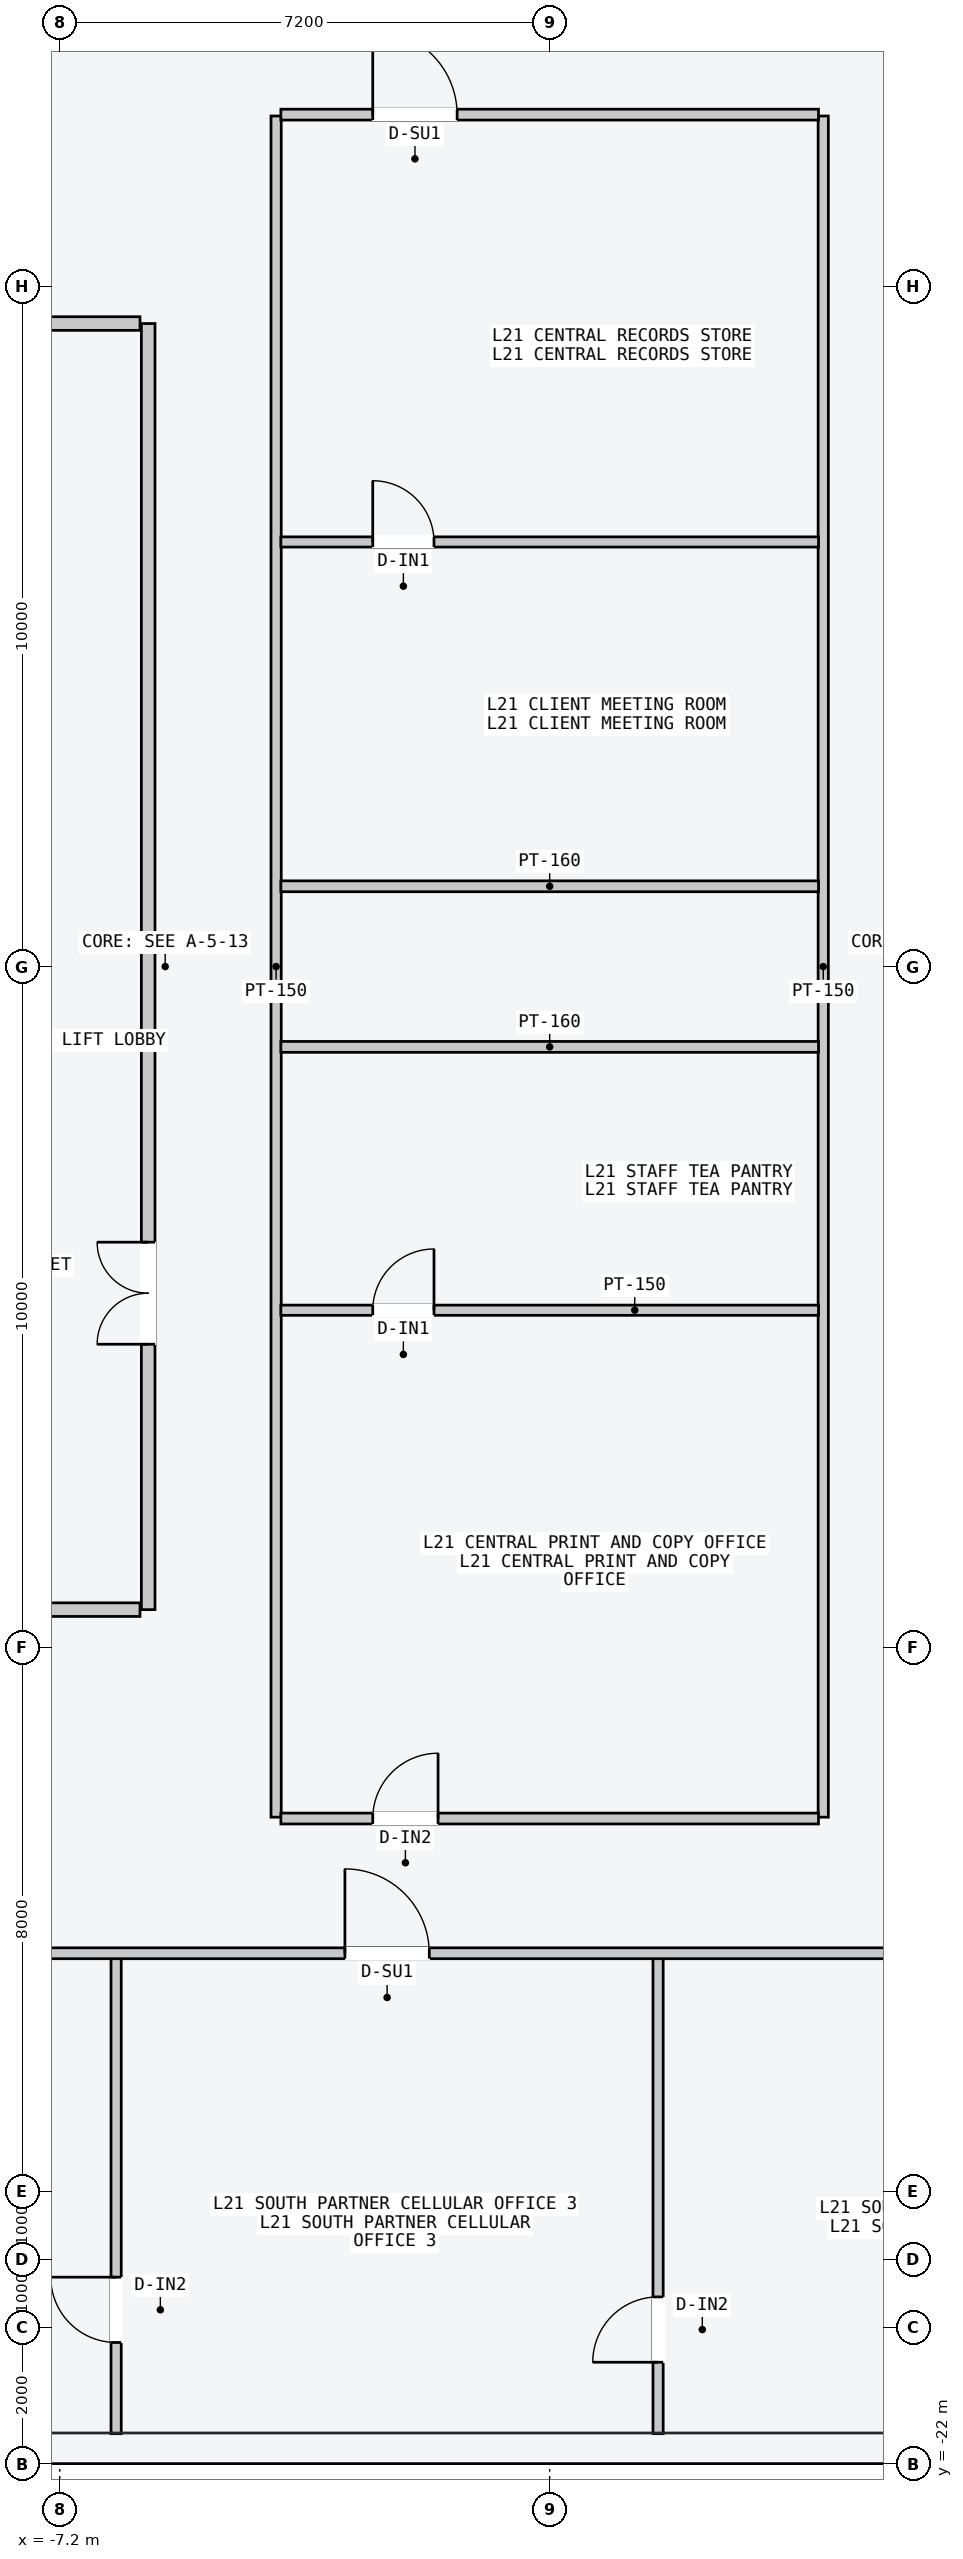
"""IFC4 building model, lengths in metres.
Left out: names, types, materials, properties, quantities, classifications, styles, units other than length and angle.
Written with IfcOpenShell. Run it as: python <this file> out.ifc"""

import sys

from ifc_helpers import new_model, si_unit, direction, frame, frame_2d, origin, place, context, subcontext, project, spatial, rectangle, extrude, element, fill, save


model = new_model("IFC4")
c1 = context("Model", 3, precision=1e-05, world=origin(), true_north=direction((0.0, 1.0)))
c2 = subcontext(c1, "Body", "Model", "MODEL_VIEW")
j1 = project(units=[si_unit("LENGTHUNIT", "METRE"), si_unit("PLANEANGLEUNIT", "RADIAN")], contexts=[c1])
p1 = place(None, origin())
s1 = spatial("IfcSite", under=j1, at=p1, CompositionType="ELEMENT")
p2 = place(p1, origin())
s2 = spatial("IfcBuilding", under=s1, at=p2, CompositionType="ELEMENT")
p3 = place(p2, frame((0.0, 0.0, 82.8)))
s3 = spatial("IfcBuildingStorey", under=s2, at=p3, CompositionType="ELEMENT", Elevation=82.8)
p4 = place(p3, frame((-5.9, -9.45, 0.0), z_axis=(0.0, 0.0, 1.0), x_axis=(0.0, 1.0, 0.0)))
e1 = element("IfcWall", 1, at=p4, inside=s3, PredefinedType="PARTITIONING", context=c2, shape_type="SweptSolid", body=[
    extrude(rectangle(XDim=18.9, YDim=0.2, at=frame_2d((9.45, 0.0))), origin(), (0.0, 0.0, 1.0), 4.3),
])
p5 = place(p4, frame((3.9, 0.0, 0.0)))
e2 = element("IfcOpeningElement", 2, at=p5, cuts=e1, PredefinedType="OPENING", context=c2, shape_type="SweptSolid", body=[
    extrude(rectangle(XDim=1.5, YDim=2.2, at=frame_2d((0.75, 1.1))), frame((0.0, 0.11, 0.0), z_axis=(0.0, -1.0, 0.0), x_axis=(1.0, 0.0, 0.0)), (0.0, 0.0, 1.0), 0.22),
])
for number, where, z_axis, x_axis in (
    (3, (-6.02, -9.45, 0.0), (0.0, 0.0, 1.0), (-1.0, 0.0, 0.0)),
    (4, (-6.02, 9.45, 0.0), (0.0, 0.0, 1.0), (-1.0, 0.0, 0.0)),
):
    element("IfcWall", number, at=place(p3, frame(where, z_axis=z_axis, x_axis=x_axis)), inside=s3, PredefinedType="PARTITIONING", context=c2, shape_type="SweptSolid", body=[
        extrude(rectangle(XDim=1.8, YDim=0.2, at=frame_2d((0.9, 0.0))), origin(), (0.0, 0.0, 1.0), 2.64),
    ])
for number, where, z_axis, x_axis in (
    (5, (-4.02, -12.5, 0.0), (0.0, 0.0, 1.0), (0.0, 1.0, 0.0)),
    (6, (4.02, -12.5, 0.0), (0.0, 0.0, 1.0), (0.0, 1.0, 0.0)),
):
    element("IfcWall", number, at=place(p3, frame(where, z_axis=z_axis, x_axis=x_axis)), inside=s3, PredefinedType="PARTITIONING", context=c2, shape_type="SweptSolid", body=[
        extrude(rectangle(XDim=25.0, YDim=0.15, at=frame_2d((12.5, 0.0))), origin(), (0.0, 0.0, 1.0), 4.3),
    ])
p6 = place(p3, frame((-3.95, 1.18, 0.0), z_axis=(0.0, 0.0, 1.0), x_axis=(1.0, 0.0, 0.0)))
e7 = element("IfcWall", 7, at=p6, inside=s3, PredefinedType="PARTITIONING", context=c2, shape_type="SweptSolid", body=[
    extrude(rectangle(XDim=7.9, YDim=0.16, at=frame_2d((3.95, 0.0))), origin(), (0.0, 0.0, 1.0), 4.3),
])
p7 = place(p3, frame((-3.95, 12.52, 0.0), z_axis=(0.0, 0.0, 1.0), x_axis=(1.0, 0.0, 0.0)))
e8 = element("IfcWall", 8, at=p7, inside=s3, PredefinedType="PARTITIONING", context=c2, shape_type="SweptSolid", body=[
    extrude(rectangle(XDim=7.9, YDim=0.16, at=frame_2d((3.95, 0.0))), origin(), (0.0, 0.0, 1.0), 4.3),
])
p8 = place(p7, frame((1.35, 0.0, 0.0)))
e9 = element("IfcOpeningElement", 9, at=p8, cuts=e8, PredefinedType="OPENING", context=c2, shape_type="SweptSolid", body=[
    extrude(rectangle(XDim=1.24, YDim=2.24, at=frame_2d((0.62, 1.12))), frame((0.0, 0.09, 0.0), z_axis=(0.0, -1.0, 0.0), x_axis=(1.0, 0.0, 0.0)), (0.0, 0.0, 1.0), 0.18),
])
p9 = place(p3, frame((-3.95, -1.18, 0.0), z_axis=(0.0, 0.0, 1.0), x_axis=(1.0, 0.0, 0.0)))
e10 = element("IfcWall", 10, at=p9, inside=s3, PredefinedType="PARTITIONING", context=c2, shape_type="SweptSolid", body=[
    extrude(rectangle(XDim=7.9, YDim=0.16, at=frame_2d((3.95, 0.0))), origin(), (0.0, 0.0, 1.0), 4.3),
])
p10 = place(p3, frame((-3.95, -12.52, 0.0), z_axis=(0.0, 0.0, 1.0), x_axis=(1.0, 0.0, 0.0)))
e11 = element("IfcWall", 11, at=p10, inside=s3, PredefinedType="PARTITIONING", context=c2, shape_type="SweptSolid", body=[
    extrude(rectangle(XDim=7.9, YDim=0.16, at=frame_2d((3.95, 0.0))), origin(), (0.0, 0.0, 1.0), 4.3),
])
p11 = place(p10, frame((1.35, 0.0, 0.0)))
e12 = element("IfcOpeningElement", 12, at=p11, cuts=e11, PredefinedType="OPENING", context=c2, shape_type="SweptSolid", body=[
    extrude(rectangle(XDim=0.96, YDim=2.18, at=frame_2d((0.48, 1.09))), frame((0.0, 0.09, 0.0), z_axis=(0.0, -1.0, 0.0), x_axis=(1.0, 0.0, 0.0)), (0.0, 0.0, 1.0), 0.18),
])
p12 = place(p3, frame((-3.95, 6.24, 0.0), z_axis=(0.0, 0.0, 1.0), x_axis=(1.0, 0.0, 0.0)))
e13 = element("IfcWall", 13, at=p12, inside=s3, PredefinedType="PARTITIONING", context=c2, shape_type="SweptSolid", body=[
    extrude(rectangle(XDim=7.9, YDim=0.15, at=frame_2d((3.95, 0.0))), origin(), (0.0, 0.0, 1.0), 4.3),
])
p13 = place(p12, frame((1.35, 0.0, 0.0)))
e14 = element("IfcOpeningElement", 14, at=p13, cuts=e13, PredefinedType="OPENING", context=c2, shape_type="SweptSolid", body=[
    extrude(rectangle(XDim=0.9, YDim=2.15, at=frame_2d((0.45, 1.075))), frame((0.0, 0.085, 0.0), z_axis=(0.0, -1.0, 0.0), x_axis=(1.0, 0.0, 0.0)), (0.0, 0.0, 1.0), 0.17),
])
p14 = place(p3, frame((-3.95, -5.05, 0.0), z_axis=(0.0, 0.0, 1.0), x_axis=(1.0, 0.0, 0.0)))
e15 = element("IfcWall", 15, at=p14, inside=s3, PredefinedType="PARTITIONING", context=c2, shape_type="SweptSolid", body=[
    extrude(rectangle(XDim=7.9, YDim=0.15, at=frame_2d((3.95, 0.0))), origin(), (0.0, 0.0, 1.0), 4.3),
])
p15 = place(p14, frame((1.35, 0.0, 0.0)))
e16 = element("IfcOpeningElement", 16, at=p15, cuts=e15, PredefinedType="OPENING", context=c2, shape_type="SweptSolid", body=[
    extrude(rectangle(XDim=0.9, YDim=2.15, at=frame_2d((0.45, 1.075))), frame((0.0, 0.085, 0.0), z_axis=(0.0, -1.0, 0.0), x_axis=(1.0, 0.0, 0.0)), (0.0, 0.0, 1.0), 0.17),
])
p16 = place(p3, frame((-6.371, -21.56, 0.0), z_axis=(0.0, 0.0, 1.0), x_axis=(0.0, 1.0, 0.0)))
e17 = element("IfcWall", 17, at=p16, inside=s3, PredefinedType="PARTITIONING", context=c2, shape_type="SweptSolid", body=[
    extrude(rectangle(XDim=7.0, YDim=0.15, at=frame_2d((3.5, 0.0))), origin(), (0.0, 0.0, 1.0), 4.3),
])
p17 = place(p16, frame((1.34, 0.0, 0.0)))
e18 = element("IfcOpeningElement", 18, at=p17, cuts=e17, PredefinedType="OPENING", context=c2, shape_type="SweptSolid", body=[
    extrude(rectangle(XDim=0.96, YDim=2.18, at=frame_2d((0.48, 1.09))), frame((0.0, 0.085, 0.0), z_axis=(0.0, -1.0, 0.0), x_axis=(1.0, 0.0, 0.0)), (0.0, 0.0, 1.0), 0.17),
])
p18 = place(p3, frame((1.593, -21.56, 0.0), z_axis=(0.0, 0.0, 1.0), x_axis=(0.0, 1.0, 0.0)))
e19 = element("IfcWall", 19, at=p18, inside=s3, PredefinedType="PARTITIONING", context=c2, shape_type="SweptSolid", body=[
    extrude(rectangle(XDim=7.0, YDim=0.15, at=frame_2d((3.5, 0.0))), origin(), (0.0, 0.0, 1.0), 4.3),
])
p19 = place(p18, frame((1.05, 0.0, 0.0)))
e20 = element("IfcOpeningElement", 20, at=p19, cuts=e19, PredefinedType="OPENING", context=c2, shape_type="SweptSolid", body=[
    extrude(rectangle(XDim=0.96, YDim=2.18, at=frame_2d((0.48, 1.09))), frame((0.0, 0.085, 0.0), z_axis=(0.0, -1.0, 0.0), x_axis=(1.0, 0.0, 0.0)), (0.0, 0.0, 1.0), 0.17),
])
p20 = place(p3, frame((-18.0, -14.5, 0.0), z_axis=(0.0, 0.0, 1.0), x_axis=(1.0, 0.0, 0.0)))
e21 = element("IfcWall", 21, at=p20, inside=s3, PredefinedType="PARTITIONING", context=c2, shape_type="SweptSolid", body=[
    extrude(rectangle(XDim=36.0, YDim=0.16, at=frame_2d((18.0, 0.0))), origin(), (0.0, 0.0, 1.0), 4.3),
])
p21 = place(p20, frame((1.721, 0.0, 0.0)))
e22 = element("IfcOpeningElement", 22, at=p21, cuts=e21, PredefinedType="OPENING", context=c2, shape_type="SweptSolid", body=[
    extrude(rectangle(XDim=1.02, YDim=2.2, at=frame_2d((0.51, 1.1))), frame((0.0, 0.09, 0.0), z_axis=(0.0, -1.0, 0.0), x_axis=(1.0, 0.0, 0.0)), (0.0, 0.0, 1.0), 0.18),
])
p22 = place(p20, frame((7.515, 0.0, 0.0)))
e23 = element("IfcOpeningElement", 23, at=p22, cuts=e21, PredefinedType="OPENING", context=c2, shape_type="SweptSolid", body=[
    extrude(rectangle(XDim=1.06, YDim=2.2, at=frame_2d((0.53, 1.1))), frame((0.0, 0.09, 0.0), z_axis=(0.0, -1.0, 0.0), x_axis=(1.0, 0.0, 0.0)), (0.0, 0.0, 1.0), 0.18),
])
p23 = place(p20, frame((14.991, 0.0, 0.0)))
e24 = element("IfcOpeningElement", 24, at=p23, cuts=e21, PredefinedType="OPENING", context=c2, shape_type="SweptSolid", body=[
    extrude(rectangle(XDim=1.24, YDim=2.24, at=frame_2d((0.62, 1.12))), frame((0.0, 0.09, 0.0), z_axis=(0.0, -1.0, 0.0), x_axis=(1.0, 0.0, 0.0)), (0.0, 0.0, 1.0), 0.18),
])
p24 = place(p20, frame((23.273, 0.0, 0.0)))
e25 = element("IfcOpeningElement", 25, at=p24, cuts=e21, PredefinedType="OPENING", context=c2, shape_type="SweptSolid", body=[
    extrude(rectangle(XDim=1.4, YDim=2.2, at=frame_2d((0.7, 1.1))), frame((0.0, 0.09, 0.0), z_axis=(0.0, -1.0, 0.0), x_axis=(1.0, 0.0, 0.0)), (0.0, 0.0, 1.0), 0.18),
])
p25 = place(p20, frame((31.727, 0.0, 0.0)))
e26 = element("IfcOpeningElement", 26, at=p25, cuts=e21, PredefinedType="OPENING", context=c2, shape_type="SweptSolid", body=[
    extrude(rectangle(XDim=0.9, YDim=2.15, at=frame_2d((0.45, 1.075))), frame((0.0, 0.09, 0.0), z_axis=(0.0, -1.0, 0.0), x_axis=(1.0, 0.0, 0.0)), (0.0, 0.0, 1.0), 0.18),
])
p26 = place(p5, origin())
e27 = element("IfcDoor", 27, at=p26, inside=s3, OperationType="DOUBLE_DOOR_SINGLE_SWING", PredefinedType="DOOR", context=c2, shape_type="SweptSolid", body=[
    extrude(rectangle(XDim=1.5, YDim=2.2, at=frame_2d((0.75, 1.1))), frame((0.0, 0.025, 0.0), z_axis=(0.0, -1.0, 0.0), x_axis=(1.0, 0.0, 0.0)), (0.0, 0.0, 1.0), 0.05),
])
fill(e2, e27)
p27 = place(p8, origin())
e28 = element("IfcDoor", 28, at=p27, inside=s3, OperationType="SINGLE_SWING_LEFT", PredefinedType="DOOR", context=c2, shape_type="SweptSolid", body=[
    extrude(rectangle(XDim=1.24, YDim=2.24, at=frame_2d((0.62, 1.12))), frame((0.0, 0.025, 0.0), z_axis=(0.0, -1.0, 0.0), x_axis=(1.0, 0.0, 0.0)), (0.0, 0.0, 1.0), 0.05),
])
fill(e9, e28)
p28 = place(p11, origin())
e29 = element("IfcDoor", 29, at=p28, inside=s3, OperationType="SINGLE_SWING_RIGHT", PredefinedType="DOOR", context=c2, shape_type="SweptSolid", body=[
    extrude(rectangle(XDim=0.96, YDim=2.18, at=frame_2d((0.48, 1.09))), frame((0.0, 0.025, 0.0), z_axis=(0.0, -1.0, 0.0), x_axis=(1.0, 0.0, 0.0)), (0.0, 0.0, 1.0), 0.05),
])
fill(e12, e29)
p29 = place(p13, origin())
e30 = element("IfcDoor", 30, at=p29, inside=s3, OperationType="SINGLE_SWING_LEFT", PredefinedType="DOOR", context=c2, shape_type="SweptSolid", body=[
    extrude(rectangle(XDim=0.9, YDim=2.15, at=frame_2d((0.45, 1.075))), frame((0.0, 0.025, 0.0), z_axis=(0.0, -1.0, 0.0), x_axis=(1.0, 0.0, 0.0)), (0.0, 0.0, 1.0), 0.05),
])
fill(e14, e30)
p30 = place(p15, origin())
e31 = element("IfcDoor", 31, at=p30, inside=s3, OperationType="SINGLE_SWING_RIGHT", PredefinedType="DOOR", context=c2, shape_type="SweptSolid", body=[
    extrude(rectangle(XDim=0.9, YDim=2.15, at=frame_2d((0.45, 1.075))), frame((0.0, 0.025, 0.0), z_axis=(0.0, -1.0, 0.0), x_axis=(1.0, 0.0, 0.0)), (0.0, 0.0, 1.0), 0.05),
])
fill(e16, e31)
p31 = place(p17, origin())
e32 = element("IfcDoor", 32, at=p31, inside=s3, OperationType="SINGLE_SWING_RIGHT", PredefinedType="DOOR", context=c2, shape_type="SweptSolid", body=[
    extrude(rectangle(XDim=0.96, YDim=2.18, at=frame_2d((0.48, 1.09))), frame((0.0, 0.025, 0.0), z_axis=(0.0, -1.0, 0.0), x_axis=(1.0, 0.0, 0.0)), (0.0, 0.0, 1.0), 0.05),
])
fill(e18, e32)
p32 = place(p19, origin())
e33 = element("IfcDoor", 33, at=p32, inside=s3, OperationType="SINGLE_SWING_LEFT", PredefinedType="DOOR", context=c2, shape_type="SweptSolid", body=[
    extrude(rectangle(XDim=0.96, YDim=2.18, at=frame_2d((0.48, 1.09))), frame((0.0, 0.025, 0.0), z_axis=(0.0, -1.0, 0.0), x_axis=(1.0, 0.0, 0.0)), (0.0, 0.0, 1.0), 0.05),
])
fill(e20, e33)
p33 = place(p23, origin())
e34 = element("IfcDoor", 34, at=p33, inside=s3, OperationType="SINGLE_SWING_LEFT", PredefinedType="DOOR", context=c2, shape_type="SweptSolid", body=[
    extrude(rectangle(XDim=1.24, YDim=2.24, at=frame_2d((0.62, 1.12))), frame((0.0, 0.025, 0.0), z_axis=(0.0, -1.0, 0.0), x_axis=(1.0, 0.0, 0.0)), (0.0, 0.0, 1.0), 0.05),
])
fill(e24, e34)
save(model, sys.argv[1])
